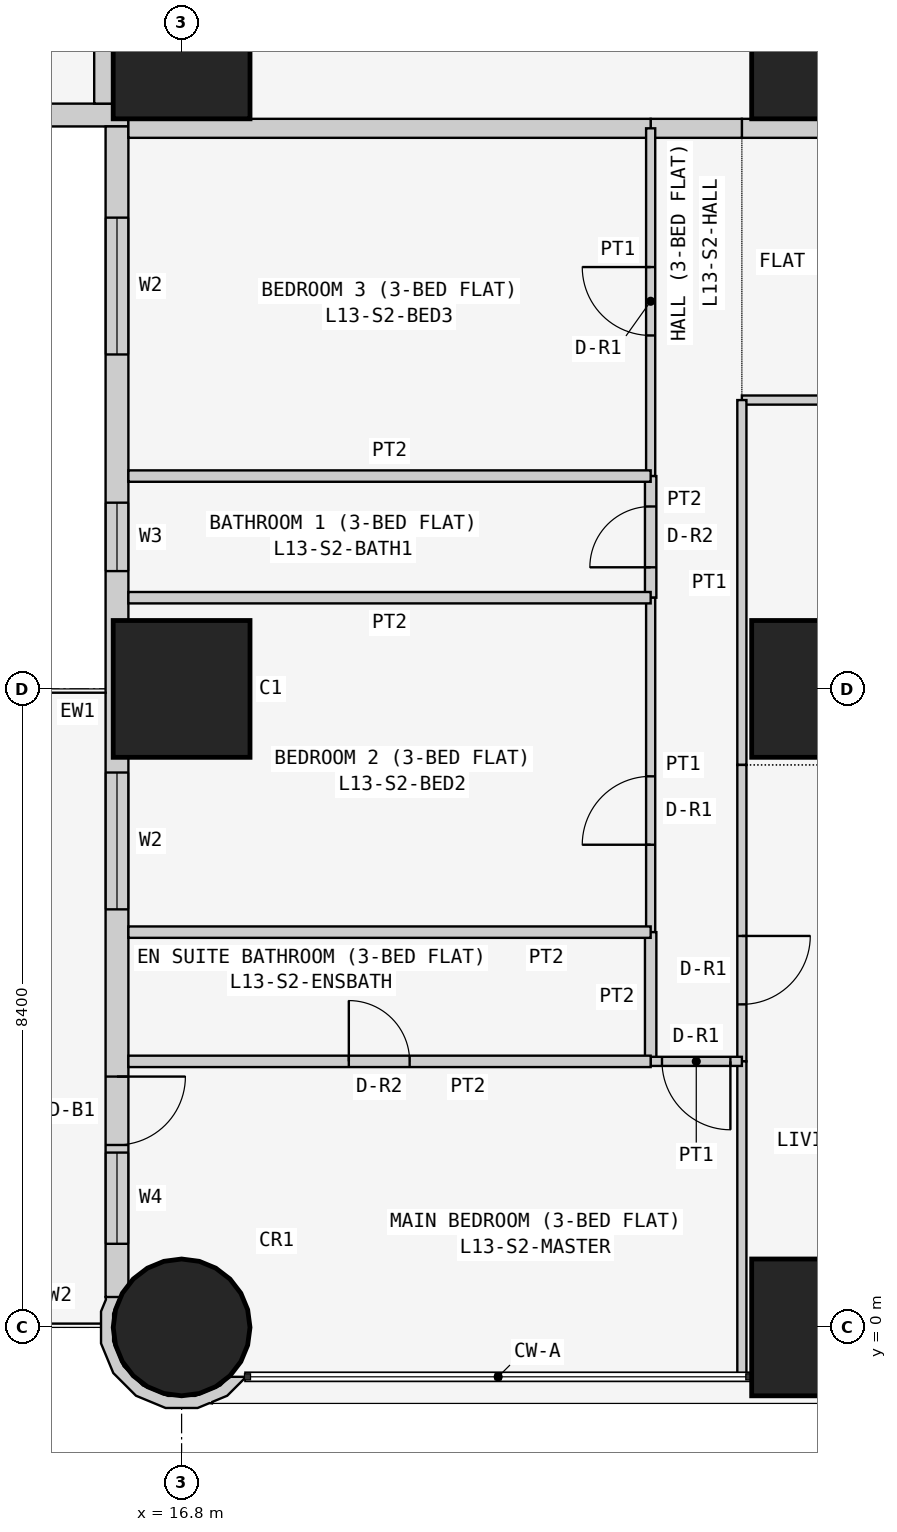
"""IFC4 building model, lengths in metres.
Left out: names, types, materials, properties, quantities, classifications, styles, units other than length and angle.
Written with IfcOpenShell. Run it as: python <this file> out.ifc"""

import sys

from ifc_helpers import new_model, si_unit, direction, frame, frame_2d, origin, origin_2d, place, context, subcontext, project, spatial, polyline, rectangle, circle, outline, extrude, element, fill, save


model = new_model("IFC4")
c1 = context("Model", 3, precision=1e-05, world=origin(), true_north=direction((0.0, 1.0)))
c2 = subcontext(c1, "Body", "Model", "MODEL_VIEW")
j1 = project(units=[si_unit("LENGTHUNIT", "METRE"), si_unit("PLANEANGLEUNIT", "RADIAN")], contexts=[c1])
p1 = place(None, origin())
s1 = spatial("IfcSite", under=j1, at=p1, CompositionType="ELEMENT")
p2 = place(p1, origin())
s2 = spatial("IfcBuilding", under=s1, at=p2, CompositionType="ELEMENT")
p3 = place(p2, frame((0.0, 0.0, 56.1)))
s3 = spatial("IfcBuildingStorey", under=s2, at=p3, CompositionType="ELEMENT", Elevation=56.1)
p4 = place(p3, frame((16.8, 0.0, 0.0), z_axis=(0.0, 0.0, 1.0), x_axis=(1.0, 0.0, 0.0)))
e1 = element("IfcColumn", 1, at=p4, inside=s3, PredefinedType="COLUMN", context=c2, shape_type="SweptSolid", body=[
    extrude(circle(Radius=0.9, at=origin_2d()), origin(), (0.0, 0.0, 1.0), 3.6),
])
for number, where, z_axis, x_axis in (
    (2, (16.8, 8.4, 0.0), (0.0, 0.0, 1.0), (1.0, 0.0, 0.0)),
    (3, (16.8, 16.8, 0.0), (0.0, 0.0, 1.0), (1.0, 0.0, 0.0)),
    (4, (25.2, 0.0, 0.0), (0.0, 0.0, 1.0), (1.0, 0.0, 0.0)),
    (5, (25.2, 8.4, 0.0), (0.0, 0.0, 1.0), (1.0, 0.0, 0.0)),
    (6, (25.2, 16.8, 0.0), (0.0, 0.0, 1.0), (1.0, 0.0, 0.0)),
):
    element("IfcColumn", number, at=place(p3, frame(where, z_axis=z_axis, x_axis=x_axis)), inside=s3, PredefinedType="COLUMN", context=c2, shape_type="SweptSolid", body=[
        extrude(rectangle(XDim=1.8, YDim=1.8, at=origin_2d()), origin(), (0.0, 0.0, 1.0), 3.6),
    ])
p5 = place(p3, frame((0.4, 15.95, 0.0), z_axis=(0.0, 0.0, 1.0), x_axis=(1.0, 0.0, 0.0)))
e7 = element("IfcWall", 7, at=p5, inside=s3, PredefinedType="SOLIDWALL", context=c2, shape_type="SweptSolid", body=[
    extrude(rectangle(XDim=15.7, YDim=0.3, at=frame_2d((7.85, 0.0))), origin(), (0.0, 0.0, 1.0), 3.45),
])
p6 = place(p5, frame((12.4, 0.0, 0.9)))
e8 = element("IfcOpeningElement", 8, at=p6, cuts=e7, PredefinedType="OPENING", context=c2, shape_type="SweptSolid", body=[
    extrude(rectangle(XDim=1.8, YDim=1.5, at=frame_2d((0.9, 0.75))), frame((0.0, 0.16, 0.0), z_axis=(0.0, -1.0, 0.0), x_axis=(1.0, 0.0, 0.0)), (0.0, 0.0, 1.0), 0.32),
])
p7 = place(p5, frame((9.55, 0.0, 1.5)))
e9 = element("IfcOpeningElement", 9, at=p7, cuts=e7, PredefinedType="OPENING", context=c2, shape_type="SweptSolid", body=[
    extrude(rectangle(XDim=0.9, YDim=0.7, at=frame_2d((0.45, 0.35))), frame((0.0, 0.16, 0.0), z_axis=(0.0, -1.0, 0.0), x_axis=(1.0, 0.0, 0.0)), (0.0, 0.0, 1.0), 0.32),
])
p8 = place(p5, frame((5.1, 0.0, 0.9)))
e10 = element("IfcOpeningElement", 10, at=p8, cuts=e7, PredefinedType="OPENING", context=c2, shape_type="SweptSolid", body=[
    extrude(rectangle(XDim=1.8, YDim=1.5, at=frame_2d((0.9, 0.75))), frame((0.0, 0.16, 0.0), z_axis=(0.0, -1.0, 0.0), x_axis=(1.0, 0.0, 0.0)), (0.0, 0.0, 1.0), 0.32),
])
p9 = place(p5, frame((2.0, 0.0, 0.0)))
e11 = element("IfcOpeningElement", 11, at=p9, cuts=e7, PredefinedType="OPENING", context=c2, shape_type="SweptSolid", body=[
    extrude(rectangle(XDim=0.9, YDim=2.4, at=frame_2d((0.45, 1.2))), frame((0.0, 0.16, 0.0), z_axis=(0.0, -1.0, 0.0), x_axis=(1.0, 0.0, 0.0)), (0.0, 0.0, 1.0), 0.32),
])
p10 = place(p5, frame((0.7, 0.0, 0.9)))
e12 = element("IfcOpeningElement", 12, at=p10, cuts=e7, PredefinedType="OPENING", context=c2, shape_type="SweptSolid", body=[
    extrude(rectangle(XDim=1.2, YDim=1.5, at=frame_2d((0.6, 0.75))), frame((0.0, 0.16, 0.0), z_axis=(0.0, -1.0, 0.0), x_axis=(1.0, 0.0, 0.0)), (0.0, 0.0, 1.0), 0.32),
])
p11 = place(p3, frame((15.95, 15.8, 0.0), z_axis=(0.0, 0.0, 1.0), x_axis=(0.0, -1.0, 0.0)))
e13 = element("IfcWall", 13, at=p11, inside=s3, PredefinedType="SOLIDWALL", context=c2, shape_type="SweptSolid", body=[
    extrude(rectangle(XDim=15.4, YDim=0.3, at=frame_2d((7.7, 0.0))), origin(), (0.0, 0.0, 1.0), 3.45),
])
p12 = place(p11, frame((1.2, 0.0, 0.9)))
e14 = element("IfcOpeningElement", 14, at=p12, cuts=e13, PredefinedType="OPENING", context=c2, shape_type="SweptSolid", body=[
    extrude(rectangle(XDim=1.8, YDim=1.5, at=frame_2d((0.9, 0.75))), frame((0.0, 0.16, 0.0), z_axis=(0.0, -1.0, 0.0), x_axis=(1.0, 0.0, 0.0)), (0.0, 0.0, 1.0), 0.32),
])
p13 = place(p11, frame((4.95, 0.0, 1.5)))
e15 = element("IfcOpeningElement", 15, at=p13, cuts=e13, PredefinedType="OPENING", context=c2, shape_type="SweptSolid", body=[
    extrude(rectangle(XDim=0.9, YDim=0.7, at=frame_2d((0.45, 0.35))), frame((0.0, 0.16, 0.0), z_axis=(0.0, -1.0, 0.0), x_axis=(1.0, 0.0, 0.0)), (0.0, 0.0, 1.0), 0.32),
])
p14 = place(p11, frame((8.5, 0.0, 0.9)))
e16 = element("IfcOpeningElement", 16, at=p14, cuts=e13, PredefinedType="OPENING", context=c2, shape_type="SweptSolid", body=[
    extrude(rectangle(XDim=1.8, YDim=1.5, at=frame_2d((0.9, 0.75))), frame((0.0, 0.16, 0.0), z_axis=(0.0, -1.0, 0.0), x_axis=(1.0, 0.0, 0.0)), (0.0, 0.0, 1.0), 0.32),
])
p15 = place(p11, frame((12.5, 0.0, 0.0)))
e17 = element("IfcOpeningElement", 17, at=p15, cuts=e13, PredefinedType="OPENING", context=c2, shape_type="SweptSolid", body=[
    extrude(rectangle(XDim=0.9, YDim=2.4, at=frame_2d((0.45, 1.2))), frame((0.0, 0.16, 0.0), z_axis=(0.0, -1.0, 0.0), x_axis=(1.0, 0.0, 0.0)), (0.0, 0.0, 1.0), 0.32),
])
p16 = place(p11, frame((13.5, 0.0, 0.9)))
e18 = element("IfcOpeningElement", 18, at=p16, cuts=e13, PredefinedType="OPENING", context=c2, shape_type="SweptSolid", body=[
    extrude(rectangle(XDim=1.2, YDim=1.5, at=frame_2d((0.6, 0.75))), frame((0.0, 0.16, 0.0), z_axis=(0.0, -1.0, 0.0), x_axis=(1.0, 0.0, 0.0)), (0.0, 0.0, 1.0), 0.32),
])
p17 = place(p3, frame((15.89, 0.364, 0.0), z_axis=(0.0, 0.0, 1.0), x_axis=(-0.377204953059, -0.926129809145, 0.0)))
e19 = element("IfcWall", 19, at=p17, inside=s3, PredefinedType="SOLIDWALL", context=c2, shape_type="SweptSolid", body=[
    extrude(outline(polyline([(0.36, 1.803), (0.509, 1.741), (0.761, 1.486), (0.896, 1.154), (0.894, 0.795), (0.755, 0.465), (0.5, 0.213), (0.168, 0.078), (-0.1, 0.08), (0.001, -0.097), (0.03, -0.08), (0.199, -0.081), (0.589, 0.078), (0.889, 0.374), (1.053, 0.763), (1.055, 1.185), (0.896, 1.575), (0.778, 1.695), (0.769, 1.728), (0.75, 1.723), (0.6, 1.875), (0.295, 2.004), (0.281, 1.998), (0.36, 1.803)])), origin(), (0.0, 0.0, 1.0), 3.45),
])
p18 = place(p3, frame((29.4, 15.775, 0.0), z_axis=(0.0, 0.0, 1.0), x_axis=(-1.0, 0.0, 0.0)))
e20 = element("IfcWall", 20, at=p18, inside=s3, PredefinedType="PARTITIONING", context=c2, shape_type="SweptSolid", body=[
    extrude(rectangle(XDim=5.229, YDim=0.25, at=frame_2d((2.615, 0.0))), origin(), (0.0, 0.0, 1.0), 3.45),
])
p19 = place(p18, frame((2.1, 0.0, 0.0)))
e21 = element("IfcOpeningElement", 21, at=p19, cuts=e20, PredefinedType="OPENING", context=c2, shape_type="SweptSolid", body=[
    extrude(rectangle(XDim=1.0, YDim=2.1, at=frame_2d((0.5, 1.05))), frame((0.0, 0.135, 0.0), z_axis=(0.0, -1.0, 0.0), x_axis=(1.0, 0.0, 0.0)), (0.0, 0.0, 1.0), 0.27),
])
p20 = place(p3, frame((24.171, 15.775, 0.0), z_axis=(0.0, 0.0, 1.0), x_axis=(-1.0, 0.0, 0.0)))
e22 = element("IfcWall", 22, at=p20, inside=s3, PredefinedType="PARTITIONING", context=c2, shape_type="SweptSolid", body=[
    extrude(rectangle(XDim=1.2, YDim=0.25, at=frame_2d((0.6, 0.0))), origin(), (0.0, 0.0, 1.0), 3.45),
])
for number, where, z_axis, x_axis in (
    (23, (22.971, 15.775, 0.0), (0.0, 0.0, 1.0), (-1.0, 0.0, 0.0)),
    (24, (15.775, 16.1, 0.0), (0.0, 0.0, 1.0), (0.0, 1.0, 0.0)),
):
    element("IfcWall", number, at=place(p3, frame(where, z_axis=z_axis, x_axis=x_axis)), inside=s3, PredefinedType="PARTITIONING", context=c2, shape_type="SweptSolid", body=[
        extrude(rectangle(XDim=6.871, YDim=0.25, at=frame_2d((3.436, 0.0))), origin(), (0.0, 0.0, 1.0), 3.45),
    ])
p21 = place(p3, frame((29.4, 12.2, 0.0), z_axis=(0.0, 0.0, 1.0), x_axis=(-1.0, 0.0, 0.0)))
e25 = element("IfcWall", 25, at=p21, inside=s3, PredefinedType="PARTITIONING", context=c2, shape_type="SweptSolid", body=[
    extrude(rectangle(XDim=5.229, YDim=0.12, at=frame_2d((2.615, 0.0))), origin(), (0.0, 0.0, 1.0), 3.45),
])
p22 = place(p21, frame((1.05, 0.0, 0.0)))
e26 = element("IfcOpeningElement", 26, at=p22, cuts=e25, PredefinedType="OPENING", context=c2, shape_type="SweptSolid", body=[
    extrude(rectangle(XDim=0.9, YDim=2.1, at=frame_2d((0.45, 1.05))), frame((0.0, 0.07, 0.0), z_axis=(0.0, -1.0, 0.0), x_axis=(1.0, 0.0, 0.0)), (0.0, 0.0, 1.0), 0.14),
])
p23 = place(p3, frame((24.171, 7.4, 0.0), z_axis=(0.0, 0.0, 1.0), x_axis=(0.0, 1.0, 0.0)))
e27 = element("IfcWall", 27, at=p23, inside=s3, PredefinedType="PARTITIONING", context=c2, shape_type="SweptSolid", body=[
    extrude(rectangle(XDim=4.8, YDim=0.12, at=frame_2d((2.4, 0.0))), origin(), (0.0, 0.0, 1.0), 3.45),
])
p24 = place(p3, frame((24.171, 3.5, 0.0), z_axis=(0.0, 0.0, 1.0), x_axis=(0.0, 1.0, 0.0)))
e28 = element("IfcWall", 28, at=p24, inside=s3, PredefinedType="PARTITIONING", context=c2, shape_type="SweptSolid", body=[
    extrude(rectangle(XDim=3.9, YDim=0.12, at=frame_2d((1.95, 0.0))), origin(), (0.0, 0.0, 1.0), 3.45),
])
p25 = place(p24, frame((0.75, 0.0, 0.0)))
e29 = element("IfcOpeningElement", 29, at=p25, cuts=e28, PredefinedType="OPENING", context=c2, shape_type="SweptSolid", body=[
    extrude(rectangle(XDim=0.9, YDim=2.1, at=frame_2d((0.45, 1.05))), frame((0.0, 0.07, 0.0), z_axis=(0.0, -1.0, 0.0), x_axis=(1.0, 0.0, 0.0)), (0.0, 0.0, 1.0), 0.14),
])
p26 = place(p3, frame((24.171, -0.65, 0.0), z_axis=(0.0, 0.0, 1.0), x_axis=(0.0, 1.0, 0.0)))
e30 = element("IfcWall", 30, at=p26, inside=s3, PredefinedType="PARTITIONING", context=c2, shape_type="SweptSolid", body=[
    extrude(rectangle(XDim=4.15, YDim=0.12, at=frame_2d((2.075, 0.0))), origin(), (0.0, 0.0, 1.0), 3.45),
])
p27 = place(p3, frame((22.971, 11.2, 0.0), z_axis=(0.0, 0.0, 1.0), x_axis=(0.0, 1.0, 0.0)))
e31 = element("IfcWall", 31, at=p27, inside=s3, PredefinedType="PARTITIONING", context=c2, shape_type="SweptSolid", body=[
    extrude(rectangle(XDim=4.575, YDim=0.12, at=frame_2d((2.288, 0.0))), origin(), (0.0, 0.0, 1.0), 3.45),
])
p28 = place(p27, frame((1.85, 0.0, 0.0)))
e32 = element("IfcOpeningElement", 32, at=p28, cuts=e31, PredefinedType="OPENING", context=c2, shape_type="SweptSolid", body=[
    extrude(rectangle(XDim=0.9, YDim=2.1, at=frame_2d((0.45, 1.05))), frame((0.0, 0.07, 0.0), z_axis=(0.0, -1.0, 0.0), x_axis=(1.0, 0.0, 0.0)), (0.0, 0.0, 1.0), 0.14),
])
p29 = place(p3, frame((22.971, 9.6, 0.0), z_axis=(0.0, 0.0, 1.0), x_axis=(0.0, 1.0, 0.0)))
e33 = element("IfcWall", 33, at=p29, inside=s3, PredefinedType="PARTITIONING", context=c2, shape_type="SweptSolid", body=[
    extrude(rectangle(XDim=1.6, YDim=0.15, at=frame_2d((0.8, 0.0))), origin(), (0.0, 0.0, 1.0), 3.45),
])
p30 = place(p29, frame((0.4, 0.0, 0.0)))
e34 = element("IfcOpeningElement", 34, at=p30, cuts=e33, PredefinedType="OPENING", context=c2, shape_type="SweptSolid", body=[
    extrude(rectangle(XDim=0.8, YDim=2.1, at=frame_2d((0.4, 1.05))), frame((0.0, 0.085, 0.0), z_axis=(0.0, -1.0, 0.0), x_axis=(1.0, 0.0, 0.0)), (0.0, 0.0, 1.0), 0.17),
])
p31 = place(p3, frame((22.971, 5.2, 0.0), z_axis=(0.0, 0.0, 1.0), x_axis=(0.0, 1.0, 0.0)))
e35 = element("IfcWall", 35, at=p31, inside=s3, PredefinedType="PARTITIONING", context=c2, shape_type="SweptSolid", body=[
    extrude(rectangle(XDim=4.4, YDim=0.12, at=frame_2d((2.2, 0.0))), origin(), (0.0, 0.0, 1.0), 3.45),
])
p32 = place(p31, frame((1.15, 0.0, 0.0)))
e36 = element("IfcOpeningElement", 36, at=p32, cuts=e35, PredefinedType="OPENING", context=c2, shape_type="SweptSolid", body=[
    extrude(rectangle(XDim=0.9, YDim=2.1, at=frame_2d((0.45, 1.05))), frame((0.0, 0.07, 0.0), z_axis=(0.0, -1.0, 0.0), x_axis=(1.0, 0.0, 0.0)), (0.0, 0.0, 1.0), 0.14),
])
p33 = place(p3, frame((22.971, 3.5, 0.0), z_axis=(0.0, 0.0, 1.0), x_axis=(0.0, 1.0, 0.0)))
e37 = element("IfcWall", 37, at=p33, inside=s3, PredefinedType="PARTITIONING", context=c2, shape_type="SweptSolid", body=[
    extrude(rectangle(XDim=1.7, YDim=0.15, at=frame_2d((0.85, 0.0))), origin(), (0.0, 0.0, 1.0), 3.45),
])
p34 = place(p3, frame((24.171, 3.5, 0.0), z_axis=(0.0, 0.0, 1.0), x_axis=(-1.0, 0.0, 0.0)))
e38 = element("IfcWall", 38, at=p34, inside=s3, PredefinedType="PARTITIONING", context=c2, shape_type="SweptSolid", body=[
    extrude(rectangle(XDim=1.2, YDim=0.12, at=frame_2d((0.6, 0.0))), origin(), (0.0, 0.0, 1.0), 3.45),
])
p35 = place(p34, frame((0.151, 0.0, 0.0)))
e39 = element("IfcOpeningElement", 39, at=p35, cuts=e38, PredefinedType="OPENING", context=c2, shape_type="SweptSolid", body=[
    extrude(rectangle(XDim=0.9, YDim=2.1, at=frame_2d((0.45, 1.05))), frame((0.0, 0.07, 0.0), z_axis=(0.0, -1.0, 0.0), x_axis=(1.0, 0.0, 0.0)), (0.0, 0.0, 1.0), 0.14),
])
for number, where, z_axis, x_axis in (
    (40, (22.971, 11.2, 0.0), (0.0, 0.0, 1.0), (-1.0, 0.0, 0.0)),
    (41, (22.971, 9.6, 0.0), (0.0, 0.0, 1.0), (-1.0, 0.0, 0.0)),
    (42, (22.971, 5.2, 0.0), (0.0, 0.0, 1.0), (-1.0, 0.0, 0.0)),
):
    element("IfcWall", number, at=place(p3, frame(where, z_axis=z_axis, x_axis=x_axis)), inside=s3, PredefinedType="PARTITIONING", context=c2, shape_type="SweptSolid", body=[
        extrude(rectangle(XDim=6.871, YDim=0.15, at=frame_2d((3.436, 0.0))), origin(), (0.0, 0.0, 1.0), 3.45),
    ])
p36 = place(p3, frame((22.971, 3.5, 0.0), z_axis=(0.0, 0.0, 1.0), x_axis=(-1.0, 0.0, 0.0)))
e43 = element("IfcWall", 43, at=p36, inside=s3, PredefinedType="PARTITIONING", context=c2, shape_type="SweptSolid", body=[
    extrude(rectangle(XDim=6.871, YDim=0.15, at=frame_2d((3.436, 0.0))), origin(), (0.0, 0.0, 1.0), 3.45),
])
p37 = place(p36, frame((3.171, 0.0, 0.0)))
e44 = element("IfcOpeningElement", 44, at=p37, cuts=e43, PredefinedType="OPENING", context=c2, shape_type="SweptSolid", body=[
    extrude(rectangle(XDim=0.8, YDim=2.1, at=frame_2d((0.4, 1.05))), frame((0.0, 0.085, 0.0), z_axis=(0.0, -1.0, 0.0), x_axis=(1.0, 0.0, 0.0)), (0.0, 0.0, 1.0), 0.17),
])
p38 = place(p12, origin())
e45 = element("IfcWindow", 45, at=p38, inside=s3, PartitioningType="SINGLE_PANEL", PredefinedType="WINDOW", context=c2, shape_type="SweptSolid", body=[
    extrude(rectangle(XDim=1.8, YDim=1.5, at=frame_2d((0.9, 0.75))), frame((0.0, 0.03, 0.0), z_axis=(0.0, -1.0, 0.0), x_axis=(1.0, 0.0, 0.0)), (0.0, 0.0, 1.0), 0.06),
])
fill(e14, e45)
p39 = place(p13, origin())
e46 = element("IfcWindow", 46, at=p39, inside=s3, PartitioningType="SINGLE_PANEL", PredefinedType="WINDOW", context=c2, shape_type="SweptSolid", body=[
    extrude(rectangle(XDim=0.9, YDim=0.7, at=frame_2d((0.45, 0.35))), frame((0.0, 0.03, 0.0), z_axis=(0.0, -1.0, 0.0), x_axis=(1.0, 0.0, 0.0)), (0.0, 0.0, 1.0), 0.06),
])
fill(e15, e46)
p40 = place(p14, origin())
e47 = element("IfcWindow", 47, at=p40, inside=s3, PartitioningType="SINGLE_PANEL", PredefinedType="WINDOW", context=c2, shape_type="SweptSolid", body=[
    extrude(rectangle(XDim=1.8, YDim=1.5, at=frame_2d((0.9, 0.75))), frame((0.0, 0.03, 0.0), z_axis=(0.0, -1.0, 0.0), x_axis=(1.0, 0.0, 0.0)), (0.0, 0.0, 1.0), 0.06),
])
fill(e16, e47)
p41 = place(p15, origin())
e48 = element("IfcDoor", 48, at=p41, inside=s3, OperationType="SINGLE_SWING_LEFT", PredefinedType="DOOR", context=c2, shape_type="SweptSolid", body=[
    extrude(rectangle(XDim=0.9, YDim=2.4, at=frame_2d((0.45, 1.2))), frame((0.0, 0.025, 0.0), z_axis=(0.0, -1.0, 0.0), x_axis=(1.0, 0.0, 0.0)), (0.0, 0.0, 1.0), 0.05),
])
fill(e17, e48)
p42 = place(p16, origin())
e49 = element("IfcWindow", 49, at=p42, inside=s3, PartitioningType="SINGLE_PANEL", PredefinedType="WINDOW", context=c2, shape_type="SweptSolid", body=[
    extrude(rectangle(XDim=1.2, YDim=1.5, at=frame_2d((0.6, 0.75))), frame((0.0, 0.03, 0.0), z_axis=(0.0, -1.0, 0.0), x_axis=(1.0, 0.0, 0.0)), (0.0, 0.0, 1.0), 0.06),
])
fill(e18, e49)
p43 = place(p25, frame((0.9, 0.0, 0.0), z_axis=(0.0, 0.0, 1.0), x_axis=(-1.0, 0.0, 0.0)))
e50 = element("IfcDoor", 50, at=p43, inside=s3, OperationType="SINGLE_SWING_LEFT", PredefinedType="DOOR", context=c2, shape_type="SweptSolid", body=[
    extrude(rectangle(XDim=0.9, YDim=2.1, at=frame_2d((0.45, 1.05))), frame((0.0, 0.025, 0.0), z_axis=(0.0, -1.0, 0.0), x_axis=(1.0, 0.0, 0.0)), (0.0, 0.0, 1.0), 0.05),
])
fill(e29, e50)
p44 = place(p28, origin())
e51 = element("IfcDoor", 51, at=p44, inside=s3, OperationType="SINGLE_SWING_RIGHT", PredefinedType="DOOR", context=c2, shape_type="SweptSolid", body=[
    extrude(rectangle(XDim=0.9, YDim=2.1, at=frame_2d((0.45, 1.05))), frame((0.0, 0.025, 0.0), z_axis=(0.0, -1.0, 0.0), x_axis=(1.0, 0.0, 0.0)), (0.0, 0.0, 1.0), 0.05),
])
fill(e32, e51)
p45 = place(p30, origin())
e52 = element("IfcDoor", 52, at=p45, inside=s3, OperationType="SINGLE_SWING_LEFT", PredefinedType="DOOR", context=c2, shape_type="SweptSolid", body=[
    extrude(rectangle(XDim=0.8, YDim=2.1, at=frame_2d((0.4, 1.05))), frame((0.0, 0.025, 0.0), z_axis=(0.0, -1.0, 0.0), x_axis=(1.0, 0.0, 0.0)), (0.0, 0.0, 1.0), 0.05),
])
fill(e34, e52)
p46 = place(p32, origin())
e53 = element("IfcDoor", 53, at=p46, inside=s3, OperationType="SINGLE_SWING_LEFT", PredefinedType="DOOR", context=c2, shape_type="SweptSolid", body=[
    extrude(rectangle(XDim=0.9, YDim=2.1, at=frame_2d((0.45, 1.05))), frame((0.0, 0.025, 0.0), z_axis=(0.0, -1.0, 0.0), x_axis=(1.0, 0.0, 0.0)), (0.0, 0.0, 1.0), 0.05),
])
fill(e36, e53)
p47 = place(p35, origin())
e54 = element("IfcDoor", 54, at=p47, inside=s3, OperationType="SINGLE_SWING_LEFT", PredefinedType="DOOR", context=c2, shape_type="SweptSolid", body=[
    extrude(rectangle(XDim=0.9, YDim=2.1, at=frame_2d((0.45, 1.05))), frame((0.0, 0.025, 0.0), z_axis=(0.0, -1.0, 0.0), x_axis=(1.0, 0.0, 0.0)), (0.0, 0.0, 1.0), 0.05),
])
fill(e39, e54)
p48 = place(p37, frame((0.8, 0.0, 0.0), z_axis=(0.0, 0.0, 1.0), x_axis=(-1.0, 0.0, 0.0)))
e55 = element("IfcDoor", 55, at=p48, inside=s3, OperationType="SINGLE_SWING_LEFT", PredefinedType="DOOR", context=c2, shape_type="SweptSolid", body=[
    extrude(rectangle(XDim=0.8, YDim=2.1, at=frame_2d((0.4, 1.05))), frame((0.0, 0.025, 0.0), z_axis=(0.0, -1.0, 0.0), x_axis=(1.0, 0.0, 0.0)), (0.0, 0.0, 1.0), 0.05),
])
fill(e44, e55)
save(model, sys.argv[1])
